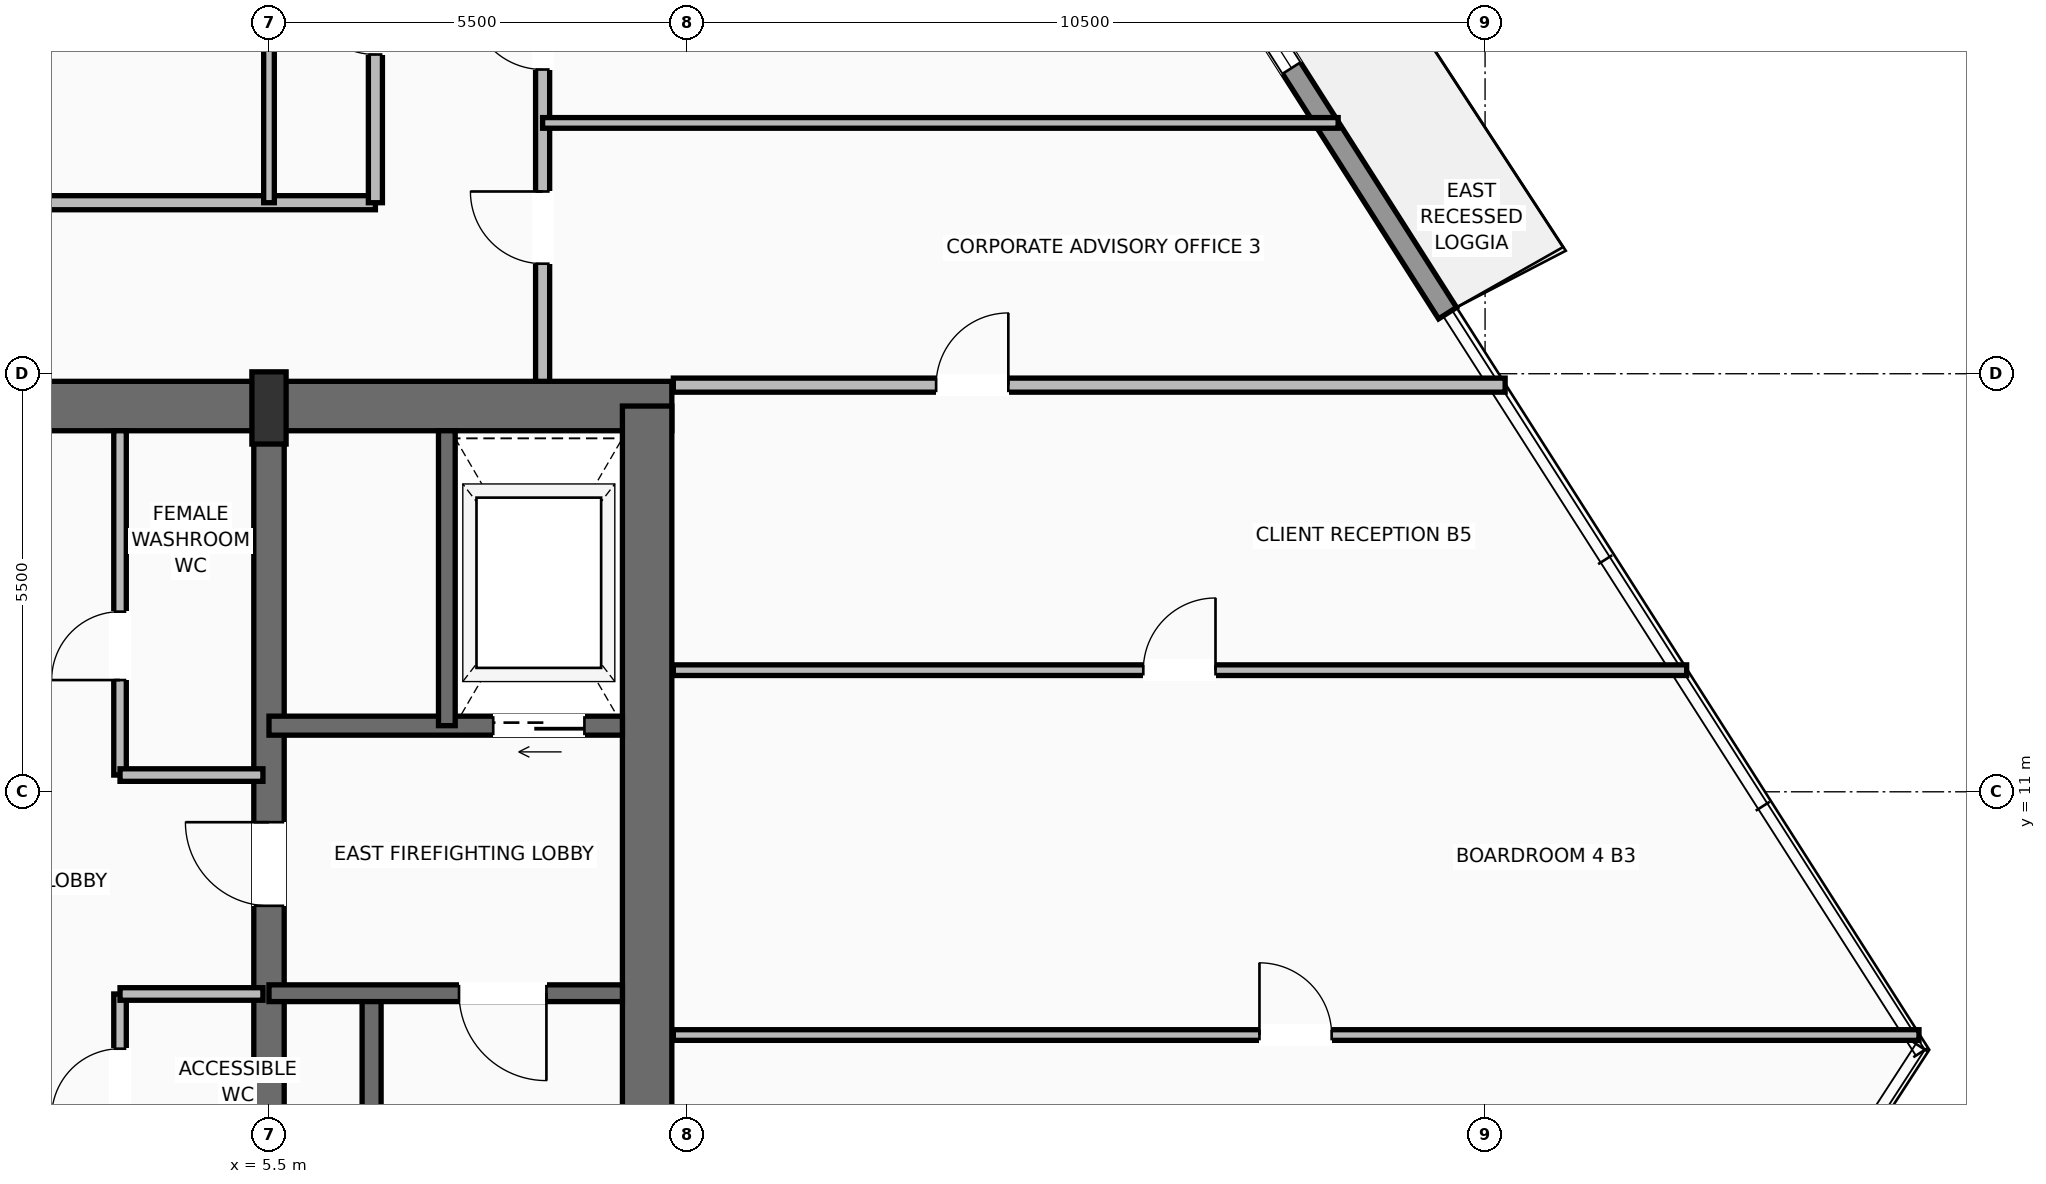
"""IFC4 building model, lengths in metres.
Left out: names, types, materials, properties, quantities, classifications, styles, units other than length and angle.
Written with IfcOpenShell. Run it as: python <this file> out.ifc"""

import sys

from ifc_helpers import new_model, si_unit, direction, frame, frame_2d, origin, origin_2d, place, context, subcontext, project, spatial, rectangle, extrude, source, transform, mapped, element, fill, save


model = new_model("IFC4")
c1 = context("Model", 3, precision=1e-05, world=origin(), true_north=direction((0.0, 1.0)))
c2 = subcontext(c1, "Body", "Model", "MODEL_VIEW")
j1 = project(units=[si_unit("LENGTHUNIT", "METRE"), si_unit("PLANEANGLEUNIT", "RADIAN")], contexts=[c1])
p1 = place(None, origin())
s1 = spatial("IfcSite", under=j1, at=p1, CompositionType="ELEMENT")
p2 = place(p1, origin())
s2 = spatial("IfcBuilding", under=s1, at=p2, CompositionType="ELEMENT")
p3 = place(p2, frame((0.0, 0.0, 144.1)))
s3 = spatial("IfcBuildingStorey", under=s2, at=p3, CompositionType="ELEMENT", Elevation=144.1)
p4 = place(p3, frame((-10.8, 16.075, 0.0), z_axis=(0.0, 0.0, 1.0), x_axis=(1.0, 0.0, 0.0)))
e1 = element("IfcWall", 1, at=p4, inside=s3, PredefinedType="SHEAR", context=c2, shape_type="SweptSolid", body=[
    extrude(rectangle(XDim=21.6, YDim=0.65, at=frame_2d((10.8, 0.0))), origin(), (0.0, 0.0, 1.0), 3.47),
])
p5 = place(p4, frame((3.37, 0.0, 0.0)))
e2 = element("IfcOpeningElement", 2, at=p5, cuts=e1, PredefinedType="OPENING", context=c2, shape_type="SweptSolid", body=[
    extrude(rectangle(XDim=1.3, YDim=2.3, at=frame_2d((0.65, 1.15))), frame((0.0, 0.335, 0.0), z_axis=(0.0, -1.0, 0.0), x_axis=(1.0, 0.0, 0.0)), (0.0, 0.0, 1.0), 0.67),
])
p6 = place(p4, frame((9.8, 0.0, 0.0)))
e3 = element("IfcOpeningElement", 3, at=p6, cuts=e1, PredefinedType="OPENING", context=c2, shape_type="SweptSolid", body=[
    extrude(rectangle(XDim=2.0, YDim=2.4, at=frame_2d((1.0, 1.2))), frame((0.0, 0.335, 0.0), z_axis=(0.0, -1.0, 0.0), x_axis=(1.0, 0.0, 0.0)), (0.0, 0.0, 1.0), 0.67),
])
p7 = place(p3, frame((10.475, 0.525, 0.0), z_axis=(0.0, 0.0, 1.0), x_axis=(0.0, 1.0, 0.0)))
e4 = element("IfcWall", 4, at=p7, inside=s3, PredefinedType="SHEAR", context=c2, shape_type="SweptSolid", body=[
    extrude(rectangle(XDim=15.55, YDim=0.65, at=frame_2d((7.775, 0.0))), origin(), (0.0, 0.0, 1.0), 3.47),
])
p8 = place(p3, frame((5.5, 0.525, 0.0), z_axis=(0.0, 0.0, 1.0), x_axis=(0.0, 1.0, 0.0)))
e5 = element("IfcWall", 5, at=p8, inside=s3, PredefinedType="SHEAR", context=c2, shape_type="SweptSolid", body=[
    extrude(rectangle(XDim=15.55, YDim=0.4, at=frame_2d((7.775, 0.0))), origin(), (0.0, 0.0, 1.0), 3.47),
])
p9 = place(p8, frame((8.975, 0.0, 0.0)))
e6 = element("IfcOpeningElement", 6, at=p9, cuts=e5, PredefinedType="OPENING", context=c2, shape_type="SweptSolid", body=[
    extrude(rectangle(XDim=1.1, YDim=2.2, at=frame_2d((0.55, 1.1))), frame((0.0, 0.21, 0.0), z_axis=(0.0, -1.0, 0.0), x_axis=(1.0, 0.0, 0.0)), (0.0, 0.0, 1.0), 0.42),
])
m1 = source(origin(), c2, "Body", "SweptSolid", [
    extrude(rectangle(XDim=0.45, YDim=0.95, at=origin_2d()), origin(), (0.0, 0.0, 1.0), 3.7),
])
p10 = place(p3, frame((5.5, 16.05, 0.0), z_axis=(0.0, 0.0, 1.0), x_axis=(1.0, 0.0, 0.0)))
e7 = element("IfcColumn", 7, at=p10, inside=s3, PredefinedType="PILASTER", context=c2, shape_type="MappedRepresentation", body=[
    mapped(m1, transform((0.0, 0.0, 0.0), scale=1.0)),
])
p11 = place(p3, frame((11.233, 32.645, 0.0), z_axis=(0.0, 0.0, 1.0), x_axis=(0.537170652274, -0.843473586033, 0.0)))
e8 = element("IfcWall", 8, at=p11, inside=s3, PredefinedType="SOLIDWALL", context=c2, shape_type="SweptSolid", body=[
    extrude(rectangle(XDim=18.195, YDim=0.28, at=frame_2d((9.098, 0.0))), origin(), (0.0, 0.0, 1.0), 3.05),
])
p12 = place(p11, frame((4.367, 0.0, 0.0)))
e9 = element("IfcOpeningElement", 9, at=p12, cuts=e8, PredefinedType="OPENING", context=c2, shape_type="SweptSolid", body=[
    extrude(rectangle(XDim=1.6, YDim=2.35, at=frame_2d((0.8, 1.175))), frame((0.0, 0.15, 0.0), z_axis=(0.0, -1.0, 0.0), x_axis=(1.0, 0.0, 0.0)), (0.0, 0.0, 1.0), 0.3),
])
p13 = place(p11, frame((12.373, 0.0, 0.9)))
e10 = element("IfcOpeningElement", 10, at=p13, cuts=e8, PredefinedType="OPENING", context=c2, shape_type="SweptSolid", body=[
    extrude(rectangle(XDim=2.0, YDim=1.85, at=frame_2d((1.0, 0.925))), frame((0.0, 0.15, 0.0), z_axis=(0.0, -1.0, 0.0), x_axis=(1.0, 0.0, 0.0)), (0.0, 0.0, 1.0), 0.3),
])
p14 = place(p3, frame((6.85, 0.85, 0.0), z_axis=(0.0, 0.0, 1.0), x_axis=(0.0, 1.0, 0.0)))
e11 = element("IfcWall", 11, at=p14, inside=s3, PredefinedType="SOLIDWALL", context=c2, shape_type="SweptSolid", body=[
    extrude(rectangle(XDim=7.5, YDim=0.25, at=frame_2d((3.75, 0.0))), origin(), (0.0, 0.0, 1.0), 3.47),
])
p15 = place(p3, frame((10.15, 8.35, 0.0), z_axis=(0.0, 0.0, 1.0), x_axis=(-1.0, 0.0, 0.0)))
e12 = element("IfcWall", 12, at=p15, inside=s3, PredefinedType="SOLIDWALL", context=c2, shape_type="SweptSolid", body=[
    extrude(rectangle(XDim=4.65, YDim=0.22, at=frame_2d((2.325, 0.0))), origin(), (0.0, 0.0, 1.0), 3.47),
])
p16 = place(p15, frame((1.0, 0.0, 0.0)))
e13 = element("IfcOpeningElement", 13, at=p16, cuts=e12, PredefinedType="OPENING", context=c2, shape_type="SweptSolid", body=[
    extrude(rectangle(XDim=1.15, YDim=2.2, at=frame_2d((0.575, 1.1))), frame((0.0, 0.12, 0.0), z_axis=(0.0, -1.0, 0.0), x_axis=(1.0, 0.0, 0.0)), (0.0, 0.0, 1.0), 0.24),
])
p17 = place(p3, frame((10.15, 11.87, 0.0), z_axis=(0.0, 0.0, 1.0), x_axis=(-1.0, 0.0, 0.0)))
e14 = element("IfcWall", 14, at=p17, inside=s3, PredefinedType="SOLIDWALL", context=c2, shape_type="SweptSolid", body=[
    extrude(rectangle(XDim=4.65, YDim=0.25, at=frame_2d((2.325, 0.0))), origin(), (0.0, 0.0, 1.0), 3.47),
])
p18 = place(p17, frame((0.5, 0.0, 0.0)))
e15 = element("IfcOpeningElement", 15, at=p18, cuts=e14, PredefinedType="OPENING", context=c2, shape_type="SweptSolid", body=[
    extrude(rectangle(XDim=1.2, YDim=2.25, at=frame_2d((0.6, 1.125))), frame((0.0, 0.135, 0.0), z_axis=(0.0, -1.0, 0.0), x_axis=(1.0, 0.0, 0.0)), (0.0, 0.0, 1.0), 0.27),
])
p19 = place(p3, frame((7.84, 11.87, 0.0), z_axis=(0.0, 0.0, 1.0), x_axis=(0.0, 1.0, 0.0)))
e16 = element("IfcWall", 16, at=p19, inside=s3, PredefinedType="SOLIDWALL", context=c2, shape_type="SweptSolid", body=[
    extrude(rectangle(XDim=3.88, YDim=0.22, at=frame_2d((1.94, 0.0))), origin(), (0.0, 0.0, 1.0), 3.47),
])
p20 = place(p3, frame((3.54, 6.0, 0.0), z_axis=(0.0, 0.0, 1.0), x_axis=(0.0, 1.0, 0.0)))
e17 = element("IfcWall", 17, at=p20, inside=s3, PredefinedType="PARTITIONING", context=c2, shape_type="SweptSolid", body=[
    extrude(rectangle(XDim=2.34, YDim=0.165, at=frame_2d((1.17, 0.0))), origin(), (0.0, 0.0, 1.0), 3.462),
])
p21 = place(p20, frame((0.72, 0.0, 0.0)))
e18 = element("IfcOpeningElement", 18, at=p21, cuts=e17, PredefinedType="OPENING", context=c2, shape_type="SweptSolid", body=[
    extrude(rectangle(XDim=0.9, YDim=2.1, at=frame_2d((0.45, 1.05))), frame((0.0, 0.093, 0.0), z_axis=(0.0, -1.0, 0.0), x_axis=(1.0, 0.0, 0.0)), (0.0, 0.0, 1.0), 0.185),
])
p22 = place(p3, frame((3.54, 8.34, 0.0), z_axis=(0.0, 0.0, 1.0), x_axis=(1.0, 0.0, 0.0)))
e19 = element("IfcWall", 19, at=p22, inside=s3, PredefinedType="PARTITIONING", context=c2, shape_type="SweptSolid", body=[
    extrude(rectangle(XDim=1.88, YDim=0.165, at=frame_2d((0.94, 0.0))), origin(), (0.0, 0.0, 1.0), 3.462),
])
p23 = place(p3, frame((3.54, 11.22, 0.0), z_axis=(0.0, 0.0, 1.0), x_axis=(0.0, 1.0, 0.0)))
e20 = element("IfcWall", 20, at=p23, inside=s3, PredefinedType="PARTITIONING", context=c2, shape_type="SweptSolid", body=[
    extrude(rectangle(XDim=4.53, YDim=0.165, at=frame_2d((2.265, 0.0))), origin(), (0.0, 0.0, 1.0), 3.462),
])
p24 = place(p23, frame((1.25, 0.0, 0.0)))
e21 = element("IfcOpeningElement", 21, at=p24, cuts=e20, PredefinedType="OPENING", context=c2, shape_type="SweptSolid", body=[
    extrude(rectangle(XDim=0.9, YDim=2.1, at=frame_2d((0.45, 1.05))), frame((0.0, 0.093, 0.0), z_axis=(0.0, -1.0, 0.0), x_axis=(1.0, 0.0, 0.0)), (0.0, 0.0, 1.0), 0.185),
])
p25 = place(p3, frame((3.54, 11.22, 0.0), z_axis=(0.0, 0.0, 1.0), x_axis=(1.0, 0.0, 0.0)))
e22 = element("IfcWall", 22, at=p25, inside=s3, PredefinedType="PARTITIONING", context=c2, shape_type="SweptSolid", body=[
    extrude(rectangle(XDim=1.88, YDim=0.165, at=frame_2d((0.94, 0.0))), origin(), (0.0, 0.0, 1.0), 3.462),
])
p26 = place(p3, frame((-7.2, 18.75, 0.0), z_axis=(0.0, 0.0, 1.0), x_axis=(1.0, 0.0, 0.0)))
e23 = element("IfcWall", 23, at=p26, inside=s3, PredefinedType="PARTITIONING", context=c2, shape_type="SweptSolid", body=[
    extrude(rectangle(XDim=14.1, YDim=0.185, at=frame_2d((7.05, 0.0))), origin(), (0.0, 0.0, 1.0), 2.846),
])
p27 = place(p26, frame((6.575, 0.0, 0.0)))
e24 = element("IfcOpeningElement", 24, at=p27, cuts=e23, PredefinedType="OPENING", context=c2, shape_type="SweptSolid", body=[
    extrude(rectangle(XDim=0.95, YDim=2.2, at=frame_2d((0.475, 1.1))), frame((0.0, 0.103, 0.0), z_axis=(0.0, -1.0, 0.0), x_axis=(1.0, 0.0, 0.0)), (0.0, 0.0, 1.0), 0.205),
])
p28 = place(p3, frame((6.9, 18.75, 0.0), z_axis=(0.0, 0.0, 1.0), x_axis=(0.0, 1.0, 0.0)))
e25 = element("IfcWall", 25, at=p28, inside=s3, PredefinedType="PARTITIONING", context=c2, shape_type="SweptSolid", body=[
    extrude(rectangle(XDim=4.85, YDim=0.185, at=frame_2d((2.425, 0.0))), origin(), (0.0, 0.0, 1.0), 3.462),
])
p29 = place(p28, frame((1.95, 0.0, 0.0)))
e26 = element("IfcOpeningElement", 26, at=p29, cuts=e25, PredefinedType="OPENING", context=c2, shape_type="SweptSolid", body=[
    extrude(rectangle(XDim=0.95, YDim=2.2, at=frame_2d((0.475, 1.1))), frame((0.0, 0.103, 0.0), z_axis=(0.0, -1.0, 0.0), x_axis=(1.0, 0.0, 0.0)), (0.0, 0.0, 1.0), 0.205),
])
p30 = place(p3, frame((9.1, 16.4, 0.0), z_axis=(0.0, 0.0, 1.0), x_axis=(0.0, 1.0, 0.0)))
e27 = element("IfcWall", 27, at=p30, inside=s3, PredefinedType="PARTITIONING", context=c2, shape_type="SweptSolid", body=[
    extrude(rectangle(XDim=7.2, YDim=0.185, at=frame_2d((3.6, 0.0))), origin(), (0.0, 0.0, 1.0), 3.462),
])
p31 = place(p30, frame((4.103, 0.0, 0.0)))
e28 = element("IfcOpeningElement", 28, at=p31, cuts=e27, PredefinedType="OPENING", context=c2, shape_type="SweptSolid", body=[
    extrude(rectangle(XDim=0.95, YDim=2.2, at=frame_2d((0.475, 1.1))), frame((0.0, 0.103, 0.0), z_axis=(0.0, -1.0, 0.0), x_axis=(1.0, 0.0, 0.0)), (0.0, 0.0, 1.0), 0.205),
])
p32 = place(p30, frame((1.548, 0.0, 0.0)))
e29 = element("IfcOpeningElement", 29, at=p32, cuts=e27, PredefinedType="OPENING", context=c2, shape_type="SweptSolid", body=[
    extrude(rectangle(XDim=0.95, YDim=2.2, at=frame_2d((0.475, 1.1))), frame((0.0, 0.103, 0.0), z_axis=(0.0, -1.0, 0.0), x_axis=(1.0, 0.0, 0.0)), (0.0, 0.0, 1.0), 0.205),
])
p33 = place(p3, frame((10.82, 16.35, 0.0), z_axis=(0.0, 0.0, 1.0), x_axis=(1.0, 0.0, 0.0)))
e30 = element("IfcWall", 30, at=p33, inside=s3, PredefinedType="PARTITIONING", context=c2, shape_type="SweptSolid", body=[
    extrude(rectangle(XDim=10.944, YDim=0.185, at=frame_2d((5.472, 0.0))), origin(), (0.0, 0.0, 1.0), 3.462),
])
p34 = place(p33, frame((3.458, 0.0, 0.0)))
e31 = element("IfcOpeningElement", 31, at=p34, cuts=e30, PredefinedType="OPENING", context=c2, shape_type="SweptSolid", body=[
    extrude(rectangle(XDim=0.95, YDim=2.2, at=frame_2d((0.475, 1.1))), frame((0.0, 0.103, 0.0), z_axis=(0.0, -1.0, 0.0), x_axis=(1.0, 0.0, 0.0)), (0.0, 0.0, 1.0), 0.205),
])
p35 = place(p3, frame((5.5, 18.75, 0.0), z_axis=(0.0, 0.0, 1.0), x_axis=(0.0, 1.0, 0.0)))
e32 = element("IfcWall", 32, at=p35, inside=s3, PredefinedType="PARTITIONING", context=c2, shape_type="SweptSolid", body=[
    extrude(rectangle(XDim=13.75, YDim=0.14, at=frame_2d((6.875, 0.0))), origin(), (0.0, 0.0, 1.0), 2.846),
])
p36 = place(p3, frame((10.82, 7.8, 0.0), z_axis=(0.0, 0.0, 1.0), x_axis=(1.0, 0.0, 0.0)))
e33 = element("IfcWall", 33, at=p36, inside=s3, PredefinedType="PARTITIONING", context=c2, shape_type="SweptSolid", body=[
    extrude(rectangle(XDim=16.389, YDim=0.14, at=frame_2d((8.194, 0.0))), origin(), (0.0, 0.0, 1.0), 3.462),
])
p37 = place(p36, frame((7.712, 0.0, 0.0)))
e34 = element("IfcOpeningElement", 34, at=p37, cuts=e33, PredefinedType="OPENING", context=c2, shape_type="SweptSolid", body=[
    extrude(rectangle(XDim=0.95, YDim=2.2, at=frame_2d((0.475, 1.1))), frame((0.0, 0.08, 0.0), z_axis=(0.0, -1.0, 0.0), x_axis=(1.0, 0.0, 0.0)), (0.0, 0.0, 1.0), 0.16),
])
p38 = place(p3, frame((10.82, 12.6, 0.0), z_axis=(0.0, 0.0, 1.0), x_axis=(1.0, 0.0, 0.0)))
e35 = element("IfcWall", 35, at=p38, inside=s3, PredefinedType="PARTITIONING", context=c2, shape_type="SweptSolid", body=[
    extrude(rectangle(XDim=13.332, YDim=0.14, at=frame_2d((6.666, 0.0))), origin(), (0.0, 0.0, 1.0), 3.462),
])
p39 = place(p38, frame((6.183, 0.0, 0.0)))
e36 = element("IfcOpeningElement", 36, at=p39, cuts=e35, PredefinedType="OPENING", context=c2, shape_type="SweptSolid", body=[
    extrude(rectangle(XDim=0.95, YDim=2.2, at=frame_2d((0.475, 1.1))), frame((0.0, 0.08, 0.0), z_axis=(0.0, -1.0, 0.0), x_axis=(1.0, 0.0, 0.0)), (0.0, 0.0, 1.0), 0.16),
])
p40 = place(p3, frame((9.1, 19.8, 0.0), z_axis=(0.0, 0.0, 1.0), x_axis=(1.0, 0.0, 0.0)))
e37 = element("IfcWall", 37, at=p40, inside=s3, PredefinedType="PARTITIONING", context=c2, shape_type="SweptSolid", body=[
    extrude(rectangle(XDim=10.467, YDim=0.14, at=frame_2d((5.233, 0.0))), origin(), (0.0, 0.0, 1.0), 3.462),
])
m2 = source(origin(), c2, "Body", "SweptSolid", [
    extrude(rectangle(XDim=2.0, YDim=1.85, at=frame_2d((1.0, 0.925))), frame((0.0, 0.03, 0.0), z_axis=(0.0, -1.0, 0.0), x_axis=(1.0, 0.0, 0.0)), (0.0, 0.0, 1.0), 0.06),
])
p41 = place(p13, origin())
e38 = element("IfcWindow", 38, at=p41, inside=s3, PartitioningType="SINGLE_PANEL", PredefinedType="WINDOW", context=c2, shape_type="MappedRepresentation", body=[
    mapped(m2, transform((0.0, 0.0, 0.0), scale=1.0)),
])
fill(e10, e38)
m3 = source(origin(), c2, "Body", "SweptSolid", [
    extrude(rectangle(XDim=1.15, YDim=2.2, at=frame_2d((0.575, 1.1))), frame((0.0, 0.025, 0.0), z_axis=(0.0, -1.0, 0.0), x_axis=(1.0, 0.0, 0.0)), (0.0, 0.0, 1.0), 0.05),
])
p42 = place(p16, origin())
e39 = element("IfcDoor", 39, at=p42, inside=s3, OperationType="SINGLE_SWING_LEFT", PredefinedType="DOOR", context=c2, shape_type="MappedRepresentation", body=[
    mapped(m3, transform((0.0, 0.0, 0.0), scale=1.0)),
])
fill(e13, e39)
m4 = source(origin(), c2, "Body", "SweptSolid", [
    extrude(rectangle(XDim=1.1, YDim=2.2, at=frame_2d((0.55, 1.1))), frame((0.0, 0.025, 0.0), z_axis=(0.0, -1.0, 0.0), x_axis=(1.0, 0.0, 0.0)), (0.0, 0.0, 1.0), 0.05),
])
p43 = place(p9, origin())
e40 = element("IfcDoor", 40, at=p43, inside=s3, OperationType="SINGLE_SWING_RIGHT", PredefinedType="DOOR", context=c2, shape_type="MappedRepresentation", body=[
    mapped(m4, transform((0.0, 0.0, 0.0), scale=1.0)),
])
fill(e6, e40)
m5 = source(origin(), c2, "Body", "SweptSolid", [
    extrude(rectangle(XDim=1.2, YDim=2.25, at=frame_2d((0.6, 1.125))), frame((0.0, 0.025, 0.0), z_axis=(0.0, -1.0, 0.0), x_axis=(1.0, 0.0, 0.0)), (0.0, 0.0, 1.0), 0.05),
])
p44 = place(p18, origin())
e41 = element("IfcDoor", 41, at=p44, inside=s3, OperationType="SLIDING_TO_RIGHT", PredefinedType="DOOR", context=c2, shape_type="MappedRepresentation", body=[
    mapped(m5, transform((0.0, 0.0, 0.0), scale=1.0)),
])
fill(e15, e41)
m6 = source(origin(), c2, "Body", "SweptSolid", [
    extrude(rectangle(XDim=0.9, YDim=2.1, at=frame_2d((0.45, 1.05))), frame((0.0, 0.025, 0.0), z_axis=(0.0, -1.0, 0.0), x_axis=(1.0, 0.0, 0.0)), (0.0, 0.0, 1.0), 0.05),
])
p45 = place(p21, origin())
e42 = element("IfcDoor", 42, at=p45, inside=s3, OperationType="SINGLE_SWING_LEFT", PredefinedType="DOOR", context=c2, shape_type="MappedRepresentation", body=[
    mapped(m6, transform((0.0, 0.0, 0.0), scale=1.0)),
])
fill(e18, e42)
p46 = place(p24, origin())
e43 = element("IfcDoor", 43, at=p46, inside=s3, OperationType="SINGLE_SWING_LEFT", PredefinedType="DOOR", context=c2, shape_type="MappedRepresentation", body=[
    mapped(m6, transform((0.0, 0.0, 0.0), scale=1.0)),
])
fill(e21, e43)
m7 = source(origin(), c2, "Body", "SweptSolid", [
    extrude(rectangle(XDim=0.95, YDim=2.2, at=frame_2d((0.475, 1.1))), frame((0.0, 0.025, 0.0), z_axis=(0.0, -1.0, 0.0), x_axis=(1.0, 0.0, 0.0)), (0.0, 0.0, 1.0), 0.05),
])
p47 = place(p31, origin())
e44 = element("IfcDoor", 44, at=p47, inside=s3, OperationType="SINGLE_SWING_RIGHT", PredefinedType="DOOR", context=c2, shape_type="MappedRepresentation", body=[
    mapped(m7, transform((0.0, 0.0, 0.0), scale=1.0)),
])
fill(e28, e44)
p48 = place(p34, origin())
e45 = element("IfcDoor", 45, at=p48, inside=s3, OperationType="SINGLE_SWING_RIGHT", PredefinedType="DOOR", context=c2, shape_type="MappedRepresentation", body=[
    mapped(m7, transform((0.0, 0.0, 0.0), scale=1.0)),
])
fill(e31, e45)
p49 = place(p32, origin())
e46 = element("IfcDoor", 46, at=p49, inside=s3, OperationType="SINGLE_SWING_RIGHT", PredefinedType="DOOR", context=c2, shape_type="MappedRepresentation", body=[
    mapped(m7, transform((0.0, 0.0, 0.0), scale=1.0)),
])
fill(e29, e46)
p50 = place(p29, origin())
e47 = element("IfcDoor", 47, at=p50, inside=s3, OperationType="SINGLE_SWING_RIGHT", PredefinedType="DOOR", context=c2, shape_type="MappedRepresentation", body=[
    mapped(m7, transform((0.0, 0.0, 0.0), scale=1.0)),
])
fill(e26, e47)
p51 = place(p39, origin())
e48 = element("IfcDoor", 48, at=p51, inside=s3, OperationType="SINGLE_SWING_RIGHT", PredefinedType="DOOR", context=c2, shape_type="MappedRepresentation", body=[
    mapped(m7, transform((0.0, 0.0, 0.0), scale=1.0)),
])
fill(e36, e48)
p52 = place(p37, origin())
e49 = element("IfcDoor", 49, at=p52, inside=s3, OperationType="SINGLE_SWING_LEFT", PredefinedType="DOOR", context=c2, shape_type="MappedRepresentation", body=[
    mapped(m7, transform((0.0, 0.0, 0.0), scale=1.0)),
])
fill(e34, e49)
save(model, sys.argv[1])
